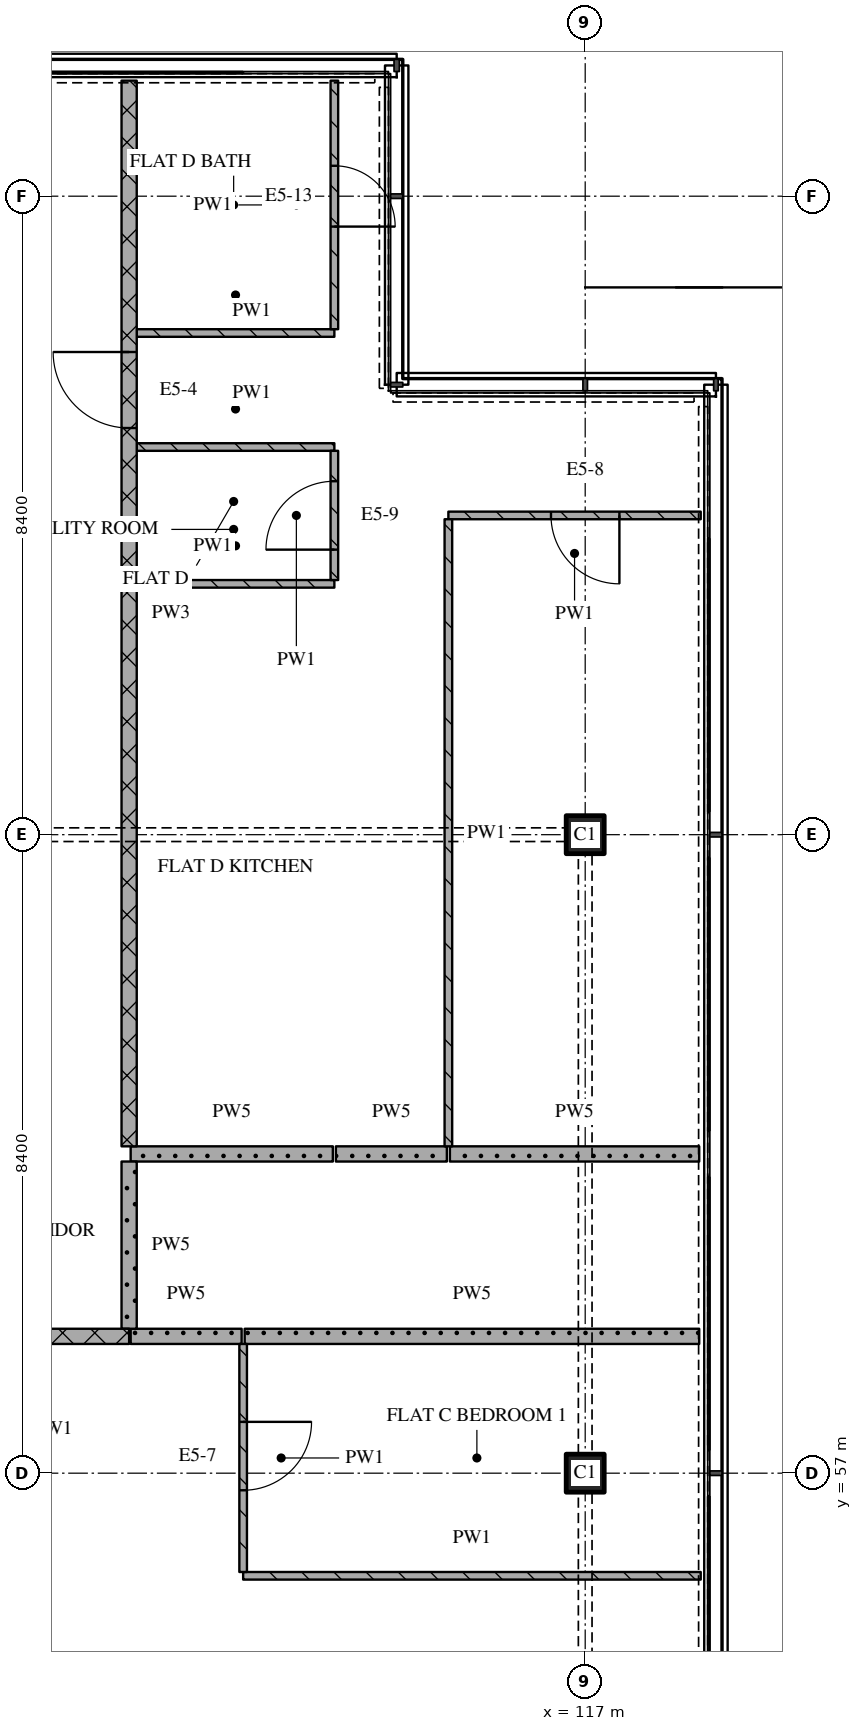
"""IFC4 building model, lengths in metres.
Left out: names, types, materials, properties, quantities, classifications, styles, units other than length and angle.
Written with IfcOpenShell. Run it as: python <this file> out.ifc"""

import sys

from ifc_helpers import new_model, si_unit, direction, frame, frame_2d, origin, origin_2d, place, context, subcontext, project, spatial, rectangle, extrude, element, fill, save


model = new_model("IFC4")
c1 = context("Model", 3, precision=1e-05, world=origin(), true_north=direction((0.0, 1.0)))
c2 = subcontext(c1, "Body", "Model", "MODEL_VIEW")
j1 = project(units=[si_unit("LENGTHUNIT", "METRE"), si_unit("PLANEANGLEUNIT", "RADIAN")], contexts=[c1])
p1 = place(None, origin())
s1 = spatial("IfcSite", under=j1, at=p1, CompositionType="ELEMENT")
p2 = place(p1, origin())
s2 = spatial("IfcBuilding", under=s1, at=p2, CompositionType="ELEMENT")
p3 = place(p2, frame((0.0, 0.0, 292.35)))
s3 = spatial("IfcBuildingStorey", under=s2, at=p3, CompositionType="ELEMENT", Elevation=292.35)
for number, where, z_axis, x_axis in (
    (1, (117.0, 57.0, 0.0), (0.0, 0.0, 1.0), (1.0, 0.0, 0.0)),
    (2, (117.0, 65.4, 0.0), (0.0, 0.0, 1.0), (1.0, 0.0, 0.0)),
):
    element("IfcColumn", number, at=place(p3, frame(where, z_axis=z_axis, x_axis=x_axis)), inside=s3, PredefinedType="COLUMN", context=c2, shape_type="SweptSolid", body=[
        extrude(rectangle(XDim=0.5, YDim=0.5, at=origin_2d()), origin(), (0.0, 0.0, 1.0), 3.6),
    ])
p4 = place(p3, frame((112.5, 55.65, 0.0), z_axis=(0.0, 0.0, 1.0), x_axis=(1.0, 0.0, 0.0)))
e3 = element("IfcWall", 3, at=p4, inside=s3, PredefinedType="PARTITIONING", context=c2, shape_type="SweptSolid", body=[
    extrude(rectangle(XDim=6.02, YDim=0.1, at=frame_2d((3.01, 0.0))), origin(), (0.0, 0.0, 1.0), 3.32),
])
p5 = place(p3, frame((101.4, 58.8, 0.0), z_axis=(0.0, 0.0, 1.0), x_axis=(1.0, 0.0, 0.0)))
e4 = element("IfcWall", 4, at=p5, inside=s3, PredefinedType="PARTITIONING", context=c2, shape_type="SweptSolid", body=[
    extrude(rectangle(XDim=9.6, YDim=0.2, at=frame_2d((4.8, 0.0))), origin(), (0.0, 0.0, 1.0), 3.32),
])
p6 = place(p3, frame((111.02, 58.8, 0.0), z_axis=(0.0, 0.0, 1.0), x_axis=(1.0, 0.0, 0.0)))
e5 = element("IfcWall", 5, at=p6, inside=s3, PredefinedType="PARTITIONING", context=c2, shape_type="SweptSolid", body=[
    extrude(rectangle(XDim=1.46, YDim=0.2, at=frame_2d((0.73, 0.0))), origin(), (0.0, 0.0, 1.0), 3.32),
])
p7 = place(p3, frame((112.52, 58.8, 0.0), z_axis=(0.0, 0.0, 1.0), x_axis=(1.0, 0.0, 0.0)))
e6 = element("IfcWall", 6, at=p7, inside=s3, PredefinedType="PARTITIONING", context=c2, shape_type="SweptSolid", body=[
    extrude(rectangle(XDim=5.98, YDim=0.2, at=frame_2d((2.99, 0.0))), origin(), (0.0, 0.0, 1.0), 3.32),
])
p8 = place(p3, frame((111.02, 61.2, 0.0), z_axis=(0.0, 0.0, 1.0), x_axis=(1.0, 0.0, 0.0)))
e7 = element("IfcWall", 7, at=p8, inside=s3, PredefinedType="PARTITIONING", context=c2, shape_type="SweptSolid", body=[
    extrude(rectangle(XDim=2.66, YDim=0.2, at=frame_2d((1.33, 0.0))), origin(), (0.0, 0.0, 1.0), 3.32),
])
p9 = place(p3, frame((113.72, 61.2, 0.0), z_axis=(0.0, 0.0, 1.0), x_axis=(1.0, 0.0, 0.0)))
e8 = element("IfcWall", 8, at=p9, inside=s3, PredefinedType="PARTITIONING", context=c2, shape_type="SweptSolid", body=[
    extrude(rectangle(XDim=1.46, YDim=0.2, at=frame_2d((0.73, 0.0))), origin(), (0.0, 0.0, 1.0), 3.32),
])
p10 = place(p3, frame((115.22, 61.2, 0.0), z_axis=(0.0, 0.0, 1.0), x_axis=(1.0, 0.0, 0.0)))
e9 = element("IfcWall", 9, at=p10, inside=s3, PredefinedType="PARTITIONING", context=c2, shape_type="SweptSolid", body=[
    extrude(rectangle(XDim=3.28, YDim=0.2, at=frame_2d((1.64, 0.0))), origin(), (0.0, 0.0, 1.0), 3.32),
])
p11 = place(p3, frame((111.1, 68.7, 0.0), z_axis=(0.0, 0.0, 1.0), x_axis=(1.0, 0.0, 0.0)))
e10 = element("IfcWall", 10, at=p11, inside=s3, PredefinedType="PARTITIONING", context=c2, shape_type="SweptSolid", body=[
    extrude(rectangle(XDim=2.6, YDim=0.1, at=frame_2d((1.3, 0.0))), origin(), (0.0, 0.0, 1.0), 3.32),
])
p12 = place(p3, frame((118.52, 69.6, 0.0), z_axis=(0.0, 0.0, 1.0), x_axis=(-1.0, 0.0, 0.0)))
e11 = element("IfcWall", 11, at=p12, inside=s3, PredefinedType="PARTITIONING", context=c2, shape_type="SweptSolid", body=[
    extrude(rectangle(XDim=3.32, YDim=0.1, at=frame_2d((1.66, 0.0))), origin(), (0.0, 0.0, 1.0), 3.32),
])
p13 = place(p12, frame((1.07, 0.0, 0.0)))
e12 = element("IfcOpeningElement", 12, at=p13, cuts=e11, PredefinedType="OPENING", context=c2, shape_type="SweptSolid", body=[
    extrude(rectangle(XDim=0.9, YDim=2.1, at=frame_2d((0.45, 1.05))), frame((0.0, 0.06, 0.0), z_axis=(0.0, -1.0, 0.0), x_axis=(1.0, 0.0, 0.0)), (0.0, 0.0, 1.0), 0.12),
])
for number, where, z_axis, x_axis in (
    (13, (111.1, 70.5, 0.0), (0.0, 0.0, 1.0), (1.0, 0.0, 0.0)),
    (14, (111.1, 72.0, 0.0), (0.0, 0.0, 1.0), (1.0, 0.0, 0.0)),
):
    element("IfcWall", number, at=place(p3, frame(where, z_axis=z_axis, x_axis=x_axis)), inside=s3, PredefinedType="PARTITIONING", context=c2, shape_type="SweptSolid", body=[
        extrude(rectangle(XDim=2.6, YDim=0.1, at=frame_2d((1.3, 0.0))), origin(), (0.0, 0.0, 1.0), 3.32),
    ])
p14 = place(p3, frame((111.0, 75.32, 0.0), z_axis=(0.0, 0.0, 1.0), x_axis=(0.0, -1.0, 0.0)))
e15 = element("IfcWall", 15, at=p14, inside=s3, PredefinedType="PARTITIONING", context=c2, shape_type="SweptSolid", body=[
    extrude(rectangle(XDim=14.02, YDim=0.2, at=frame_2d((7.01, 0.0))), origin(), (0.0, 0.0, 1.0), 3.32),
])
p15 = place(p14, frame((3.57, 0.0, 0.0)))
e16 = element("IfcOpeningElement", 16, at=p15, cuts=e15, PredefinedType="OPENING", context=c2, shape_type="SweptSolid", body=[
    extrude(rectangle(XDim=1.0, YDim=2.1, at=frame_2d((0.5, 1.05))), frame((0.0, 0.11, 0.0), z_axis=(0.0, -1.0, 0.0), x_axis=(1.0, 0.0, 0.0)), (0.0, 0.0, 1.0), 0.22),
])
p16 = place(p3, frame((111.0, 61.1, 0.0), z_axis=(0.0, 0.0, 1.0), x_axis=(0.0, -1.0, 0.0)))
e17 = element("IfcWall", 17, at=p16, inside=s3, PredefinedType="PARTITIONING", context=c2, shape_type="SweptSolid", body=[
    extrude(rectangle(XDim=2.2, YDim=0.2, at=frame_2d((1.1, 0.0))), origin(), (0.0, 0.0, 1.0), 3.32),
])
p17 = place(p3, frame((112.5, 58.7, 0.0), z_axis=(0.0, 0.0, 1.0), x_axis=(0.0, -1.0, 0.0)))
e18 = element("IfcWall", 18, at=p17, inside=s3, PredefinedType="PARTITIONING", context=c2, shape_type="SweptSolid", body=[
    extrude(rectangle(XDim=3.0, YDim=0.1, at=frame_2d((1.5, 0.0))), origin(), (0.0, 0.0, 1.0), 3.32),
])
p18 = place(p17, frame((1.025, 0.0, 0.0)))
e19 = element("IfcOpeningElement", 19, at=p18, cuts=e18, PredefinedType="OPENING", context=c2, shape_type="SweptSolid", body=[
    extrude(rectangle(XDim=0.9, YDim=2.1, at=frame_2d((0.45, 1.05))), frame((0.0, 0.06, 0.0), z_axis=(0.0, -1.0, 0.0), x_axis=(1.0, 0.0, 0.0)), (0.0, 0.0, 1.0), 0.12),
])
p19 = place(p3, frame((113.7, 68.75, 0.0), z_axis=(0.0, 0.0, 1.0), x_axis=(0.0, 1.0, 0.0)))
e20 = element("IfcWall", 20, at=p19, inside=s3, PredefinedType="PARTITIONING", context=c2, shape_type="SweptSolid", body=[
    extrude(rectangle(XDim=1.7, YDim=0.1, at=frame_2d((0.85, 0.0))), origin(), (0.0, 0.0, 1.0), 3.32),
])
p20 = place(p19, frame((0.4, 0.0, 0.0)))
e21 = element("IfcOpeningElement", 21, at=p20, cuts=e20, PredefinedType="OPENING", context=c2, shape_type="SweptSolid", body=[
    extrude(rectangle(XDim=0.9, YDim=2.1, at=frame_2d((0.45, 1.05))), frame((0.0, 0.06, 0.0), z_axis=(0.0, -1.0, 0.0), x_axis=(1.0, 0.0, 0.0)), (0.0, 0.0, 1.0), 0.12),
])
p21 = place(p3, frame((113.7, 72.05, 0.0), z_axis=(0.0, 0.0, 1.0), x_axis=(0.0, 1.0, 0.0)))
e22 = element("IfcWall", 22, at=p21, inside=s3, PredefinedType="PARTITIONING", context=c2, shape_type="SweptSolid", body=[
    extrude(rectangle(XDim=3.27, YDim=0.1, at=frame_2d((1.635, 0.0))), origin(), (0.0, 0.0, 1.0), 3.32),
])
p22 = place(p21, frame((1.35, 0.0, 0.0)))
e23 = element("IfcOpeningElement", 23, at=p22, cuts=e22, PredefinedType="OPENING", context=c2, shape_type="SweptSolid", body=[
    extrude(rectangle(XDim=0.8, YDim=2.1, at=frame_2d((0.4, 1.05))), frame((0.0, 0.06, 0.0), z_axis=(0.0, -1.0, 0.0), x_axis=(1.0, 0.0, 0.0)), (0.0, 0.0, 1.0), 0.12),
])
p23 = place(p3, frame((115.2, 69.55, 0.0), z_axis=(0.0, 0.0, 1.0), x_axis=(0.0, -1.0, 0.0)))
e24 = element("IfcWall", 24, at=p23, inside=s3, PredefinedType="PARTITIONING", context=c2, shape_type="SweptSolid", body=[
    extrude(rectangle(XDim=8.25, YDim=0.1, at=frame_2d((4.125, 0.0))), origin(), (0.0, 0.0, 1.0), 3.32),
])
p24 = place(p13, origin())
e25 = element("IfcDoor", 25, at=p24, inside=s3, OperationType="SINGLE_SWING_LEFT", PredefinedType="DOOR", context=c2, shape_type="SweptSolid", body=[
    extrude(rectangle(XDim=0.9, YDim=2.1, at=frame_2d((0.45, 1.05))), frame((0.0, 0.025, 0.0), z_axis=(0.0, -1.0, 0.0), x_axis=(1.0, 0.0, 0.0)), (0.0, 0.0, 1.0), 0.05),
])
fill(e12, e25)
p25 = place(p15, origin())
e26 = element("IfcDoor", 26, at=p25, inside=s3, OperationType="SINGLE_SWING_RIGHT", PredefinedType="DOOR", context=c2, shape_type="SweptSolid", body=[
    extrude(rectangle(XDim=1.0, YDim=2.1, at=frame_2d((0.5, 1.05))), frame((0.0, 0.025, 0.0), z_axis=(0.0, -1.0, 0.0), x_axis=(1.0, 0.0, 0.0)), (0.0, 0.0, 1.0), 0.05),
])
fill(e16, e26)
p26 = place(p18, origin())
e27 = element("IfcDoor", 27, at=p26, inside=s3, OperationType="SINGLE_SWING_LEFT", PredefinedType="DOOR", context=c2, shape_type="SweptSolid", body=[
    extrude(rectangle(XDim=0.9, YDim=2.1, at=frame_2d((0.45, 1.05))), frame((0.0, 0.025, 0.0), z_axis=(0.0, -1.0, 0.0), x_axis=(1.0, 0.0, 0.0)), (0.0, 0.0, 1.0), 0.05),
])
fill(e19, e27)
p27 = place(p20, origin())
e28 = element("IfcDoor", 28, at=p27, inside=s3, OperationType="SINGLE_SWING_LEFT", PredefinedType="DOOR", context=c2, shape_type="SweptSolid", body=[
    extrude(rectangle(XDim=0.9, YDim=2.1, at=frame_2d((0.45, 1.05))), frame((0.0, 0.025, 0.0), z_axis=(0.0, -1.0, 0.0), x_axis=(1.0, 0.0, 0.0)), (0.0, 0.0, 1.0), 0.05),
])
fill(e21, e28)
p28 = place(p22, origin())
e29 = element("IfcDoor", 29, at=p28, inside=s3, OperationType="SINGLE_SWING_RIGHT", PredefinedType="DOOR", context=c2, shape_type="SweptSolid", body=[
    extrude(rectangle(XDim=0.8, YDim=2.1, at=frame_2d((0.4, 1.05))), frame((0.0, 0.025, 0.0), z_axis=(0.0, -1.0, 0.0), x_axis=(1.0, 0.0, 0.0)), (0.0, 0.0, 1.0), 0.05),
])
fill(e23, e29)
save(model, sys.argv[1])
